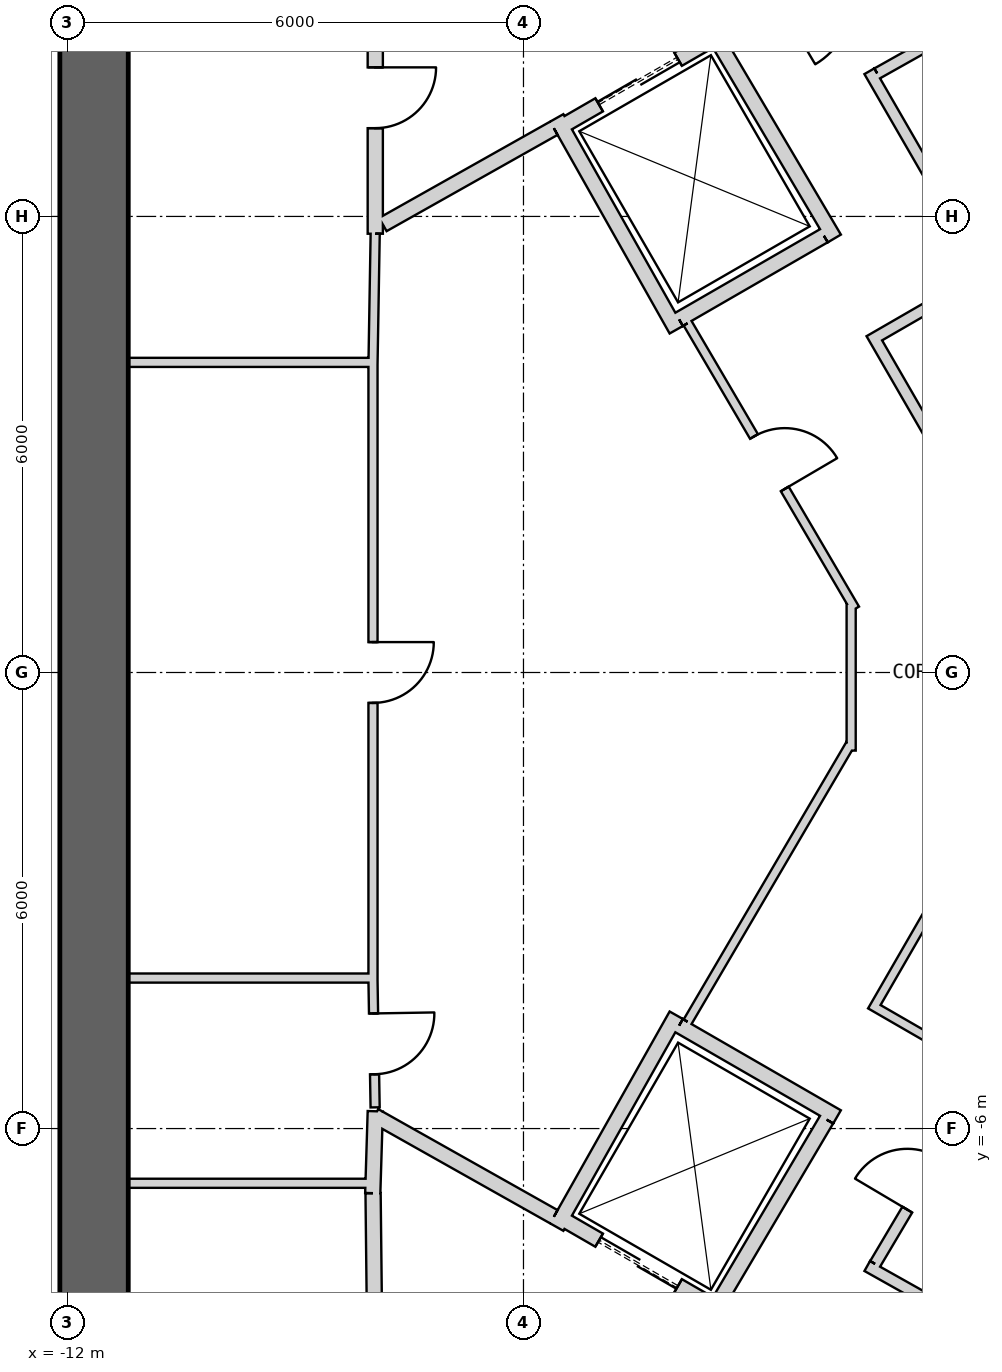
"""IFC4 building model, lengths in metres.
Left out: names, types, materials, properties, quantities, classifications, styles, units other than length and angle.
Written with IfcOpenShell. Run it as: python <this file> out.ifc"""

import sys

from ifc_helpers import new_model, si_unit, direction, frame, frame_2d, origin, place, context, subcontext, project, spatial, rectangle, extrude, element, fill, save


model = new_model("IFC4")
c1 = context("Model", 3, precision=1e-05, world=origin(), true_north=direction((0.0, 1.0)))
c2 = subcontext(c1, "Body", "Model", "MODEL_VIEW")
j1 = project(units=[si_unit("LENGTHUNIT", "METRE"), si_unit("PLANEANGLEUNIT", "RADIAN")], contexts=[c1])
p1 = place(None, origin())
s1 = spatial("IfcSite", under=j1, at=p1, CompositionType="ELEMENT")
p2 = place(p1, origin())
s2 = spatial("IfcBuilding", under=s1, at=p2, CompositionType="ELEMENT")
p3 = place(p2, frame((0.0, 0.0, 430.3)))
s3 = spatial("IfcBuildingStorey", under=s2, at=p3, CompositionType="ELEMENT", Elevation=430.3)
p4 = place(p3, frame((19.475, 2.208, 0.0), z_axis=(0.0, 0.0, 1.0), x_axis=(-0.866028369851, 0.499994862586, 0.0)))
e1 = element("IfcWall", 1, at=p4, inside=s3, PredefinedType="SHEAR", context=c2, shape_type="SweptSolid", body=[
    extrude(rectangle(XDim=31.523, YDim=0.9, at=frame_2d((15.762, 0.0))), origin(), (0.0, 0.0, 1.0), 5.0),
])
p5 = place(p4, frame((3.612, 0.0, 0.0)))
e2 = element("IfcOpeningElement", 2, at=p5, cuts=e1, PredefinedType="OPENING", context=c2, shape_type="SweptSolid", body=[
    extrude(rectangle(XDim=1.2, YDim=2.4, at=frame_2d((0.6, 1.2))), frame((0.0, 0.46, 0.0), z_axis=(0.0, -1.0, 0.0), x_axis=(1.0, 0.0, 0.0)), (0.0, 0.0, 1.0), 0.92),
])
p6 = place(p4, frame((26.712, 0.0, 0.0)))
e3 = element("IfcOpeningElement", 3, at=p6, cuts=e1, PredefinedType="OPENING", context=c2, shape_type="SweptSolid", body=[
    extrude(rectangle(XDim=1.2, YDim=2.4, at=frame_2d((0.6, 1.2))), frame((0.0, 0.46, 0.0), z_axis=(0.0, -1.0, 0.0), x_axis=(1.0, 0.0, 0.0)), (0.0, 0.0, 1.0), 0.92),
])
p7 = place(p3, frame((-11.65, 15.762, 0.0), z_axis=(0.0, 0.0, 1.0), x_axis=(0.0, -1.0, 0.0)))
e4 = element("IfcWall", 4, at=p7, inside=s3, PredefinedType="SHEAR", context=c2, shape_type="SweptSolid", body=[
    extrude(rectangle(XDim=31.523, YDim=0.9, at=frame_2d((15.762, 0.0))), origin(), (0.0, 0.0, 1.0), 5.0),
])
p8 = place(p7, frame((3.612, 0.0, 0.0)))
e5 = element("IfcOpeningElement", 5, at=p8, cuts=e4, PredefinedType="OPENING", context=c2, shape_type="SweptSolid", body=[
    extrude(rectangle(XDim=1.2, YDim=2.4, at=frame_2d((0.6, 1.2))), frame((0.0, 0.46, 0.0), z_axis=(0.0, -1.0, 0.0), x_axis=(1.0, 0.0, 0.0)), (0.0, 0.0, 1.0), 0.92),
])
p9 = place(p7, frame((26.712, 0.0, 0.0)))
e6 = element("IfcOpeningElement", 6, at=p9, cuts=e4, PredefinedType="OPENING", context=c2, shape_type="SweptSolid", body=[
    extrude(rectangle(XDim=1.2, YDim=2.4, at=frame_2d((0.6, 1.2))), frame((0.0, 0.46, 0.0), z_axis=(0.0, -1.0, 0.0), x_axis=(1.0, 0.0, 0.0)), (0.0, 0.0, 1.0), 0.92),
])
p10 = place(p3, frame((-7.825, -17.97, 0.0), z_axis=(0.0, 0.0, 1.0), x_axis=(0.866028369851, 0.499994862586, 0.0)))
e7 = element("IfcWall", 7, at=p10, inside=s3, PredefinedType="SHEAR", context=c2, shape_type="SweptSolid", body=[
    extrude(rectangle(XDim=31.523, YDim=0.9, at=frame_2d((15.762, 0.0))), origin(), (0.0, 0.0, 1.0), 5.0),
])
p11 = place(p10, frame((17.862, 0.0, 0.0)))
e8 = element("IfcOpeningElement", 8, at=p11, cuts=e7, PredefinedType="OPENING", context=c2, shape_type="SweptSolid", body=[
    extrude(rectangle(XDim=1.2, YDim=2.4, at=frame_2d((0.6, 1.2))), frame((0.0, 0.46, 0.0), z_axis=(0.0, -1.0, 0.0), x_axis=(1.0, 0.0, 0.0)), (0.0, 0.0, 1.0), 0.92),
])
p12 = place(p10, frame((20.562, 0.0, 0.0)))
e9 = element("IfcOpeningElement", 9, at=p12, cuts=e7, PredefinedType="OPENING", context=c2, shape_type="SweptSolid", body=[
    extrude(rectangle(XDim=1.2, YDim=2.4, at=frame_2d((0.6, 1.2))), frame((0.0, 0.46, 0.0), z_axis=(0.0, -1.0, 0.0), x_axis=(1.0, 0.0, 0.0)), (0.0, 0.0, 1.0), 0.92),
])
p13 = place(p10, frame((26.712, 0.0, 0.0)))
e10 = element("IfcOpeningElement", 10, at=p13, cuts=e7, PredefinedType="OPENING", context=c2, shape_type="SweptSolid", body=[
    extrude(rectangle(XDim=1.2, YDim=2.4, at=frame_2d((0.6, 1.2))), frame((0.0, 0.46, 0.0), z_axis=(0.0, -1.0, 0.0), x_axis=(1.0, 0.0, 0.0)), (0.0, 0.0, 1.0), 0.92),
])
p14 = place(p10, frame((3.612, 0.0, 0.0)))
e11 = element("IfcOpeningElement", 11, at=p14, cuts=e7, PredefinedType="OPENING", context=c2, shape_type="SweptSolid", body=[
    extrude(rectangle(XDim=1.2, YDim=2.4, at=frame_2d((0.6, 1.2))), frame((0.0, 0.46, 0.0), z_axis=(0.0, -1.0, 0.0), x_axis=(1.0, 0.0, 0.0)), (0.0, 0.0, 1.0), 0.92),
])
p15 = place(p3, frame((-5.524, 7.168, 0.0), z_axis=(0.0, 0.0, 1.0), x_axis=(0.866024647952, 0.500001309137, 0.0)))
e12 = element("IfcWall", 12, at=p15, inside=s3, PredefinedType="PLUMBINGWALL", context=c2, shape_type="SweptSolid", body=[
    extrude(rectangle(XDim=2.4, YDim=0.2, at=frame_2d((1.2, 0.0))), origin(), (0.0, 0.0, 1.0), 4.75),
])
p16 = place(p15, frame((0.6, 0.0, 0.0)))
e13 = element("IfcOpeningElement", 13, at=p16, cuts=e12, PredefinedType="OPENING", context=c2, shape_type="SweptSolid", body=[
    extrude(rectangle(XDim=1.2, YDim=2.4, at=frame_2d((0.6, 1.2))), frame((0.0, 0.11, 0.0), z_axis=(0.0, -1.0, 0.0), x_axis=(1.0, 0.0, 0.0)), (0.0, 0.0, 1.0), 0.22),
])
p17 = place(p3, frame((-2.047, 5.746, 0.0), z_axis=(0.0, 0.0, 1.0), x_axis=(-0.86605622881, -0.499946605688, 0.0)))
e14 = element("IfcWall", 14, at=p17, inside=s3, PredefinedType="PLUMBINGWALL", context=c2, shape_type="SweptSolid", body=[
    extrude(rectangle(XDim=2.2, YDim=0.2, at=frame_2d((1.1, 0.0))), origin(), (0.0, 0.0, 1.0), 4.75),
])
p18 = place(p3, frame((-3.99, 4.509, 0.0), z_axis=(0.0, 0.0, 1.0), x_axis=(-0.491358283181, 0.870957540612, 0.0)))
e15 = element("IfcWall", 15, at=p18, inside=s3, PredefinedType="PLUMBINGWALL", context=c2, shape_type="SweptSolid", body=[
    extrude(rectangle(XDim=3.2, YDim=0.2, at=frame_2d((1.6, 0.0))), origin(), (0.0, 0.0, 1.0), 4.75),
])
p19 = place(p3, frame((-3.538, 8.465, 0.0), z_axis=(0.0, 0.0, 1.0), x_axis=(0.508616218331, -0.860993346345, 0.0)))
e16 = element("IfcWall", 16, at=p19, inside=s3, PredefinedType="PLUMBINGWALL", context=c2, shape_type="SweptSolid", body=[
    extrude(rectangle(XDim=3.2, YDim=0.2, at=frame_2d((1.6, 0.0))), origin(), (0.0, 0.0, 1.0), 4.75),
])
p20 = place(p3, frame((-3.446, -8.368, 0.0), z_axis=(0.0, 0.0, 1.0), x_axis=(-0.866024647952, 0.500001309137, 0.0)))
e17 = element("IfcWall", 17, at=p20, inside=s3, PredefinedType="PLUMBINGWALL", context=c2, shape_type="SweptSolid", body=[
    extrude(rectangle(XDim=2.4, YDim=0.2, at=frame_2d((1.2, 0.0))), origin(), (0.0, 0.0, 1.0), 4.75),
])
p21 = place(p20, frame((0.6, 0.0, 0.0)))
e18 = element("IfcOpeningElement", 18, at=p21, cuts=e17, PredefinedType="OPENING", context=c2, shape_type="SweptSolid", body=[
    extrude(rectangle(XDim=1.2, YDim=2.4, at=frame_2d((0.6, 1.2))), frame((0.0, 0.11, 0.0), z_axis=(0.0, -1.0, 0.0), x_axis=(1.0, 0.0, 0.0)), (0.0, 0.0, 1.0), 0.22),
])
p22 = place(p3, frame((-5.562, -7.296, 0.0), z_axis=(0.0, 0.0, 1.0), x_axis=(0.491358283181, 0.870957540612, 0.0)))
e19 = element("IfcWall", 19, at=p22, inside=s3, PredefinedType="PLUMBINGWALL", context=c2, shape_type="SweptSolid", body=[
    extrude(rectangle(XDim=3.2, YDim=0.2, at=frame_2d((1.6, 0.0))), origin(), (0.0, 0.0, 1.0), 4.75),
])
p23 = place(p3, frame((-3.953, -4.646, 0.0), z_axis=(0.0, 0.0, 1.0), x_axis=(0.866024647952, -0.500001309137, 0.0)))
e20 = element("IfcWall", 20, at=p23, inside=s3, PredefinedType="PLUMBINGWALL", context=c2, shape_type="SweptSolid", body=[
    extrude(rectangle(XDim=2.4, YDim=0.2, at=frame_2d((1.2, 0.0))), origin(), (0.0, 0.0, 1.0), 4.75),
])
p24 = place(p3, frame((-2.012, -5.882, 0.0), z_axis=(0.0, 0.0, 1.0), x_axis=(-0.508619639323, -0.860991325447, 0.0)))
e21 = element("IfcWall", 21, at=p24, inside=s3, PredefinedType="PLUMBINGWALL", context=c2, shape_type="SweptSolid", body=[
    extrude(rectangle(XDim=3.0, YDim=0.2, at=frame_2d((1.5, 0.0))), origin(), (0.0, 0.0, 1.0), 4.75),
])
p25 = place(p3, frame((-7.95, 4.08, 0.0), z_axis=(0.0, 0.0, 1.0), x_axis=(-1.0, 0.0, 0.0)))
e22 = element("IfcWall", 22, at=p25, inside=s3, PredefinedType="PARTITIONING", context=c2, shape_type="SweptSolid", body=[
    extrude(rectangle(XDim=3.25, YDim=0.12, at=frame_2d((1.625, 0.0))), origin(), (0.0, 0.0, 1.0), 4.75),
])
p26 = place(p3, frame((-7.95, 5.772, 0.0), z_axis=(0.0, 0.0, 1.0), x_axis=(0.0, 1.0, 0.0)))
e23 = element("IfcWall", 23, at=p26, inside=s3, PredefinedType="PARTITIONING", context=c2, shape_type="SweptSolid", body=[
    extrude(rectangle(XDim=3.578, YDim=0.2, at=frame_2d((1.789, 0.0))), origin(), (0.0, 0.0, 1.0), 4.75),
])
p27 = place(p26, frame((1.389, 0.0, 0.0)))
e24 = element("IfcOpeningElement", 24, at=p27, cuts=e23, PredefinedType="OPENING", context=c2, shape_type="SweptSolid", body=[
    extrude(rectangle(XDim=0.8, YDim=2.1, at=frame_2d((0.4, 1.05))), frame((0.0, 0.11, 0.0), z_axis=(0.0, -1.0, 0.0), x_axis=(1.0, 0.0, 0.0)), (0.0, 0.0, 1.0), 0.22),
])
p28 = place(p3, frame((-7.951, 5.772, 0.0), z_axis=(0.0, 0.0, 1.0), x_axis=(-0.016723387416, -0.999860154378, 0.0)))
e25 = element("IfcWall", 25, at=p28, inside=s3, PredefinedType="PARTITIONING", context=c2, shape_type="SweptSolid", body=[
    extrude(rectangle(XDim=1.723, YDim=0.12, at=frame_2d((0.861, 0.0))), origin(), (0.0, 0.0, 1.0), 4.75),
])
p29 = place(p3, frame((-11.2, -4.02, 0.0), z_axis=(0.0, 0.0, 1.0), x_axis=(1.0, 0.0, 0.0)))
e26 = element("IfcWall", 26, at=p29, inside=s3, PredefinedType="PARTITIONING", context=c2, shape_type="SweptSolid", body=[
    extrude(rectangle(XDim=3.25, YDim=0.12, at=frame_2d((1.625, 0.0))), origin(), (0.0, 0.0, 1.0), 4.75),
])
p30 = place(p3, frame((-7.98, 4.05, 0.0), z_axis=(0.0, 0.0, 1.0), x_axis=(0.0, -1.0, 0.0)))
e27 = element("IfcWall", 27, at=p30, inside=s3, PredefinedType="PARTITIONING", context=c2, shape_type="SweptSolid", body=[
    extrude(rectangle(XDim=8.1, YDim=0.12, at=frame_2d((4.05, 0.0))), origin(), (0.0, 0.0, 1.0), 4.75),
])
p31 = place(p30, frame((3.65, 0.0, 0.0)))
e28 = element("IfcOpeningElement", 28, at=p31, cuts=e27, PredefinedType="OPENING", context=c2, shape_type="SweptSolid", body=[
    extrude(rectangle(XDim=0.8, YDim=2.1, at=frame_2d((0.4, 1.05))), frame((0.0, 0.07, 0.0), z_axis=(0.0, -1.0, 0.0), x_axis=(1.0, 0.0, 0.0)), (0.0, 0.0, 1.0), 0.14),
])
p32 = place(p3, frame((-11.2, -6.72, 0.0), z_axis=(0.0, 0.0, 1.0), x_axis=(1.0, 0.0, 0.0)))
e29 = element("IfcWall", 29, at=p32, inside=s3, PredefinedType="PARTITIONING", context=c2, shape_type="SweptSolid", body=[
    extrude(rectangle(XDim=3.25, YDim=0.12, at=frame_2d((1.625, 0.0))), origin(), (0.0, 0.0, 1.0), 4.75),
])
p33 = place(p3, frame((-7.983, -6.85, 0.0), z_axis=(0.0, 0.0, 1.0), x_axis=(0.030803413295, 0.999525462272, 0.0)))
e30 = element("IfcWall", 30, at=p33, inside=s3, PredefinedType="PARTITIONING", context=c2, shape_type="SweptSolid", body=[
    extrude(rectangle(XDim=1.078, YDim=0.2, at=frame_2d((0.539, 0.0))), origin(), (0.0, 0.0, 1.0), 4.75),
])
p34 = place(p3, frame((-7.98, -4.05, 0.0), z_axis=(0.0, 0.0, 1.0), x_axis=(0.016798213807, -0.999858900052, 0.0)))
e31 = element("IfcWall", 31, at=p34, inside=s3, PredefinedType="PARTITIONING", context=c2, shape_type="SweptSolid", body=[
    extrude(rectangle(XDim=1.671, YDim=0.12, at=frame_2d((0.836, 0.0))), origin(), (0.0, 0.0, 1.0), 4.75),
])
p35 = place(p34, frame((0.436, 0.0, 0.0)))
e32 = element("IfcOpeningElement", 32, at=p35, cuts=e31, PredefinedType="OPENING", context=c2, shape_type="SweptSolid", body=[
    extrude(rectangle(XDim=0.8, YDim=2.1, at=frame_2d((0.4, 1.05))), frame((0.0, 0.07, 0.0), z_axis=(0.0, -1.0, 0.0), x_axis=(1.0, 0.0, 0.0)), (0.0, 0.0, 1.0), 0.14),
])
p36 = place(p3, frame((-7.949, -9.55, 0.0), z_axis=(0.0, 0.0, 1.0), x_axis=(-0.011121475088, 0.999938154483, 0.0)))
e33 = element("IfcWall", 33, at=p36, inside=s3, PredefinedType="PARTITIONING", context=c2, shape_type="SweptSolid", body=[
    extrude(rectangle(XDim=2.7, YDim=0.2, at=frame_2d((1.35, 0.0))), origin(), (0.0, 0.0, 1.0), 4.75),
])
p37 = place(p3, frame((-5.6, 7.16, 0.0), z_axis=(0.0, 0.0, 1.0), x_axis=(-0.871350695252, -0.490660744185, 0.0)))
e34 = element("IfcWall", 34, at=p37, inside=s3, PredefinedType="PARTITIONING", context=c2, shape_type="SweptSolid", body=[
    extrude(rectangle(XDim=2.582, YDim=0.2, at=frame_2d((1.291, 0.0))), origin(), (0.0, 0.0, 1.0), 4.75),
])
p38 = place(p3, frame((-7.959, -5.832, 0.0), z_axis=(0.0, 0.0, 1.0), x_axis=(0.871322567751, -0.490710691679, 0.0)))
e35 = element("IfcWall", 35, at=p38, inside=s3, PredefinedType="PARTITIONING", context=c2, shape_type="SweptSolid", body=[
    extrude(rectangle(XDim=2.708, YDim=0.2, at=frame_2d((1.354, 0.0))), origin(), (0.0, 0.0, 1.0), 4.75),
])
p39 = place(p3, frame((-1.637, 0.837, 0.0), z_axis=(0.0, 0.0, 1.0), x_axis=(-0.505858978646, 0.862616191433, 0.0)))
e36 = element("IfcWall", 36, at=p39, inside=s3, PredefinedType="PARTITIONING", context=c2, shape_type="SweptSolid", body=[
    extrude(rectangle(XDim=4.357, YDim=0.12, at=frame_2d((2.179, 0.0))), origin(), (0.0, 0.0, 1.0), 4.75),
])
p40 = place(p39, frame((1.83, 0.0, 0.0)))
e37 = element("IfcOpeningElement", 37, at=p40, cuts=e36, PredefinedType="OPENING", context=c2, shape_type="SweptSolid", body=[
    extrude(rectangle(XDim=0.8, YDim=2.1, at=frame_2d((0.4, 1.05))), frame((0.0, 0.07, 0.0), z_axis=(0.0, -1.0, 0.0), x_axis=(1.0, 0.0, 0.0)), (0.0, 0.0, 1.0), 0.14),
])
p41 = place(p3, frame((-1.689, -1.027, 0.0), z_axis=(0.0, 0.0, 1.0), x_axis=(0.0, 1.0, 0.0)))
e38 = element("IfcWall", 38, at=p41, inside=s3, PredefinedType="PARTITIONING", context=c2, shape_type="SweptSolid", body=[
    extrude(rectangle(XDim=1.933, YDim=0.12, at=frame_2d((0.967, 0.0))), origin(), (0.0, 0.0, 1.0), 4.75),
])
p42 = place(p3, frame((-3.841, -4.595, 0.0), z_axis=(0.0, 0.0, 1.0), x_axis=(0.505883680705, 0.862601705074, 0.0)))
e39 = element("IfcWall", 39, at=p42, inside=s3, PredefinedType="PARTITIONING", context=c2, shape_type="SweptSolid", body=[
    extrude(rectangle(XDim=4.236, YDim=0.12, at=frame_2d((2.118, 0.0))), origin(), (0.0, 0.0, 1.0), 4.75),
])
p43 = place(p3, frame((-1.477, -7.808, 0.0), z_axis=(0.0, 0.0, 1.0), x_axis=(0.871829948107, -0.48980867855, 0.0)))
e40 = element("IfcWall", 40, at=p43, inside=s3, PredefinedType="PLUMBINGWALL", context=c2, shape_type="SweptSolid", body=[
    extrude(rectangle(XDim=2.152, YDim=0.15, at=frame_2d((1.076, 0.0))), origin(), (0.0, 0.0, 1.0), 4.75),
])
p44 = place(p3, frame((-0.119, -5.664, 0.0), z_axis=(0.0, 0.0, 1.0), x_axis=(-0.509935662771, -0.860212543406, 0.0)))
e41 = element("IfcWall", 41, at=p44, inside=s3, PredefinedType="PLUMBINGWALL", context=c2, shape_type="SweptSolid", body=[
    extrude(rectangle(XDim=2.46, YDim=0.15, at=frame_2d((1.23, 0.0))), origin(), (0.0, 0.0, 1.0), 4.75),
])
p45 = place(p44, frame((0.83, 0.0, 0.0)))
e42 = element("IfcOpeningElement", 42, at=p45, cuts=e41, PredefinedType="OPENING", context=c2, shape_type="SweptSolid", body=[
    extrude(rectangle(XDim=0.8, YDim=2.1, at=frame_2d((0.4, 1.05))), frame((0.0, 0.085, 0.0), z_axis=(0.0, -1.0, 0.0), x_axis=(1.0, 0.0, 0.0)), (0.0, 0.0, 1.0), 0.17),
])
p46 = place(p3, frame((-1.436, -4.367, 0.0), z_axis=(0.0, 0.0, 1.0), x_axis=(0.866087547558, -0.499892348375, 0.0)))
e43 = element("IfcWall", 43, at=p46, inside=s3, PredefinedType="PARTITIONING", context=c2, shape_type="SweptSolid", body=[
    extrude(rectangle(XDim=1.7, YDim=0.12, at=frame_2d((0.85, 0.0))), origin(), (0.0, 0.0, 1.0), 4.75),
])
p47 = place(p3, frame((0.095, -1.835, 0.0), z_axis=(0.0, 0.0, 1.0), x_axis=(-0.499980071345, -0.866036909293, 0.0)))
e44 = element("IfcWall", 44, at=p47, inside=s3, PredefinedType="PARTITIONING", context=c2, shape_type="SweptSolid", body=[
    extrude(rectangle(XDim=2.898, YDim=0.12, at=frame_2d((1.449, 0.0))), origin(), (0.0, 0.0, 1.0), 4.75),
])
p48 = place(p3, frame((-1.421, 4.462, 0.0), z_axis=(0.0, 0.0, 1.0), x_axis=(0.499969679245, -0.866042908773, 0.0)))
e45 = element("IfcWall", 45, at=p48, inside=s3, PredefinedType="PLUMBINGWALL", context=c2, shape_type="SweptSolid", body=[
    extrude(rectangle(XDim=2.906, YDim=0.15, at=frame_2d((1.453, 0.0))), origin(), (0.0, 0.0, 1.0), 4.75),
])
p49 = place(p3, frame((0.153, 5.285, 0.0), z_axis=(0.0, 0.0, 1.0), x_axis=(-0.866025371046, -0.500000056704, 0.0)))
e46 = element("IfcWall", 46, at=p49, inside=s3, PredefinedType="PLUMBINGWALL", context=c2, shape_type="SweptSolid", body=[
    extrude(rectangle(XDim=1.7, YDim=0.15, at=frame_2d((0.85, 0.0))), origin(), (0.0, 0.0, 1.0), 4.75),
])
p50 = place(p3, frame((-1.449, 7.91, 0.0), z_axis=(0.0, 0.0, 1.0), x_axis=(0.499990139034, -0.866031096941, 0.0)))
e47 = element("IfcWall", 47, at=p50, inside=s3, PredefinedType="PLUMBINGWALL", context=c2, shape_type="SweptSolid", body=[
    extrude(rectangle(XDim=3.0, YDim=0.15, at=frame_2d((1.5, 0.0))), origin(), (0.0, 0.0, 1.0), 4.75),
])
p51 = place(p3, frame((0.475, 8.905, 0.0), z_axis=(0.0, 0.0, 1.0), x_axis=(-0.871843752163, -0.489784107353, 0.0)))
e48 = element("IfcWall", 48, at=p51, inside=s3, PredefinedType="PLUMBINGWALL", context=c2, shape_type="SweptSolid", body=[
    extrude(rectangle(XDim=2.09, YDim=0.15, at=frame_2d((1.045, 0.0))), origin(), (0.0, 0.0, 1.0), 4.75),
])
p52 = place(p3, frame((20.834, 3.675, 0.0), z_axis=(0.0, 0.0, 1.0), x_axis=(-0.866028536494, 0.499994573949, 0.0)))
e49 = element("IfcWall", 49, at=p52, inside=s3, PredefinedType="PARTITIONING", context=c2, shape_type="SweptSolid", body=[
    extrude(rectangle(XDim=32.411, YDim=0.2, at=frame_2d((16.206, 0.0))), origin(), (0.0, 0.0, 1.0), 4.75),
])
p53 = place(p52, frame((7.7, 0.0, 0.0)))
e50 = element("IfcOpeningElement", 50, at=p53, cuts=e49, PredefinedType="OPENING", context=c2, shape_type="SweptSolid", body=[
    extrude(rectangle(XDim=1.0, YDim=2.1, at=frame_2d((0.5, 1.05))), frame((0.0, 0.11, 0.0), z_axis=(0.0, -1.0, 0.0), x_axis=(1.0, 0.0, 0.0)), (0.0, 0.0, 1.0), 0.22),
])
p54 = place(p52, frame((18.006, 0.0, 0.0)))
e51 = element("IfcOpeningElement", 51, at=p54, cuts=e49, PredefinedType="OPENING", context=c2, shape_type="SweptSolid", body=[
    extrude(rectangle(XDim=1.0, YDim=2.1, at=frame_2d((0.5, 1.05))), frame((0.0, 0.11, 0.0), z_axis=(0.0, -1.0, 0.0), x_axis=(1.0, 0.0, 0.0)), (0.0, 0.0, 1.0), 0.22),
])
p55 = place(p16, origin())
e52 = element("IfcDoor", 52, at=p55, inside=s3, OperationType="SLIDING_TO_LEFT", PredefinedType="USERDEFINED", context=c2, shape_type="SweptSolid", body=[
    extrude(rectangle(XDim=1.2, YDim=2.4, at=frame_2d((0.6, 1.2))), frame((0.0, 0.025, 0.0), z_axis=(0.0, -1.0, 0.0), x_axis=(1.0, 0.0, 0.0)), (0.0, 0.0, 1.0), 0.05),
])
fill(e13, e52)
p56 = place(p21, origin())
e53 = element("IfcDoor", 53, at=p56, inside=s3, OperationType="SLIDING_TO_LEFT", PredefinedType="USERDEFINED", context=c2, shape_type="SweptSolid", body=[
    extrude(rectangle(XDim=1.2, YDim=2.4, at=frame_2d((0.6, 1.2))), frame((0.0, 0.025, 0.0), z_axis=(0.0, -1.0, 0.0), x_axis=(1.0, 0.0, 0.0)), (0.0, 0.0, 1.0), 0.05),
])
fill(e18, e53)
p57 = place(p40, origin())
e54 = element("IfcDoor", 54, at=p57, inside=s3, OperationType="SINGLE_SWING_LEFT", PredefinedType="USERDEFINED", context=c2, shape_type="SweptSolid", body=[
    extrude(rectangle(XDim=0.8, YDim=2.1, at=frame_2d((0.4, 1.05))), frame((0.0, 0.025, 0.0), z_axis=(0.0, -1.0, 0.0), x_axis=(1.0, 0.0, 0.0)), (0.0, 0.0, 1.0), 0.05),
])
fill(e37, e54)
p58 = place(p45, origin())
e55 = element("IfcDoor", 55, at=p58, inside=s3, OperationType="SINGLE_SWING_RIGHT", PredefinedType="USERDEFINED", context=c2, shape_type="SweptSolid", body=[
    extrude(rectangle(XDim=0.8, YDim=2.1, at=frame_2d((0.4, 1.05))), frame((0.0, 0.025, 0.0), z_axis=(0.0, -1.0, 0.0), x_axis=(1.0, 0.0, 0.0)), (0.0, 0.0, 1.0), 0.05),
])
fill(e42, e55)
p59 = place(p27, origin())
e56 = element("IfcDoor", 56, at=p59, inside=s3, OperationType="SINGLE_SWING_RIGHT", PredefinedType="USERDEFINED", context=c2, shape_type="SweptSolid", body=[
    extrude(rectangle(XDim=0.8, YDim=2.1, at=frame_2d((0.4, 1.05))), frame((0.0, 0.025, 0.0), z_axis=(0.0, -1.0, 0.0), x_axis=(1.0, 0.0, 0.0)), (0.0, 0.0, 1.0), 0.05),
])
fill(e24, e56)
p60 = place(p31, origin())
e57 = element("IfcDoor", 57, at=p60, inside=s3, OperationType="SINGLE_SWING_LEFT", PredefinedType="USERDEFINED", context=c2, shape_type="SweptSolid", body=[
    extrude(rectangle(XDim=0.8, YDim=2.1, at=frame_2d((0.4, 1.05))), frame((0.0, 0.025, 0.0), z_axis=(0.0, -1.0, 0.0), x_axis=(1.0, 0.0, 0.0)), (0.0, 0.0, 1.0), 0.05),
])
fill(e28, e57)
p61 = place(p35, origin())
e58 = element("IfcDoor", 58, at=p61, inside=s3, OperationType="SINGLE_SWING_LEFT", PredefinedType="USERDEFINED", context=c2, shape_type="SweptSolid", body=[
    extrude(rectangle(XDim=0.8, YDim=2.1, at=frame_2d((0.4, 1.05))), frame((0.0, 0.025, 0.0), z_axis=(0.0, -1.0, 0.0), x_axis=(1.0, 0.0, 0.0)), (0.0, 0.0, 1.0), 0.05),
])
fill(e32, e58)
save(model, sys.argv[1])
